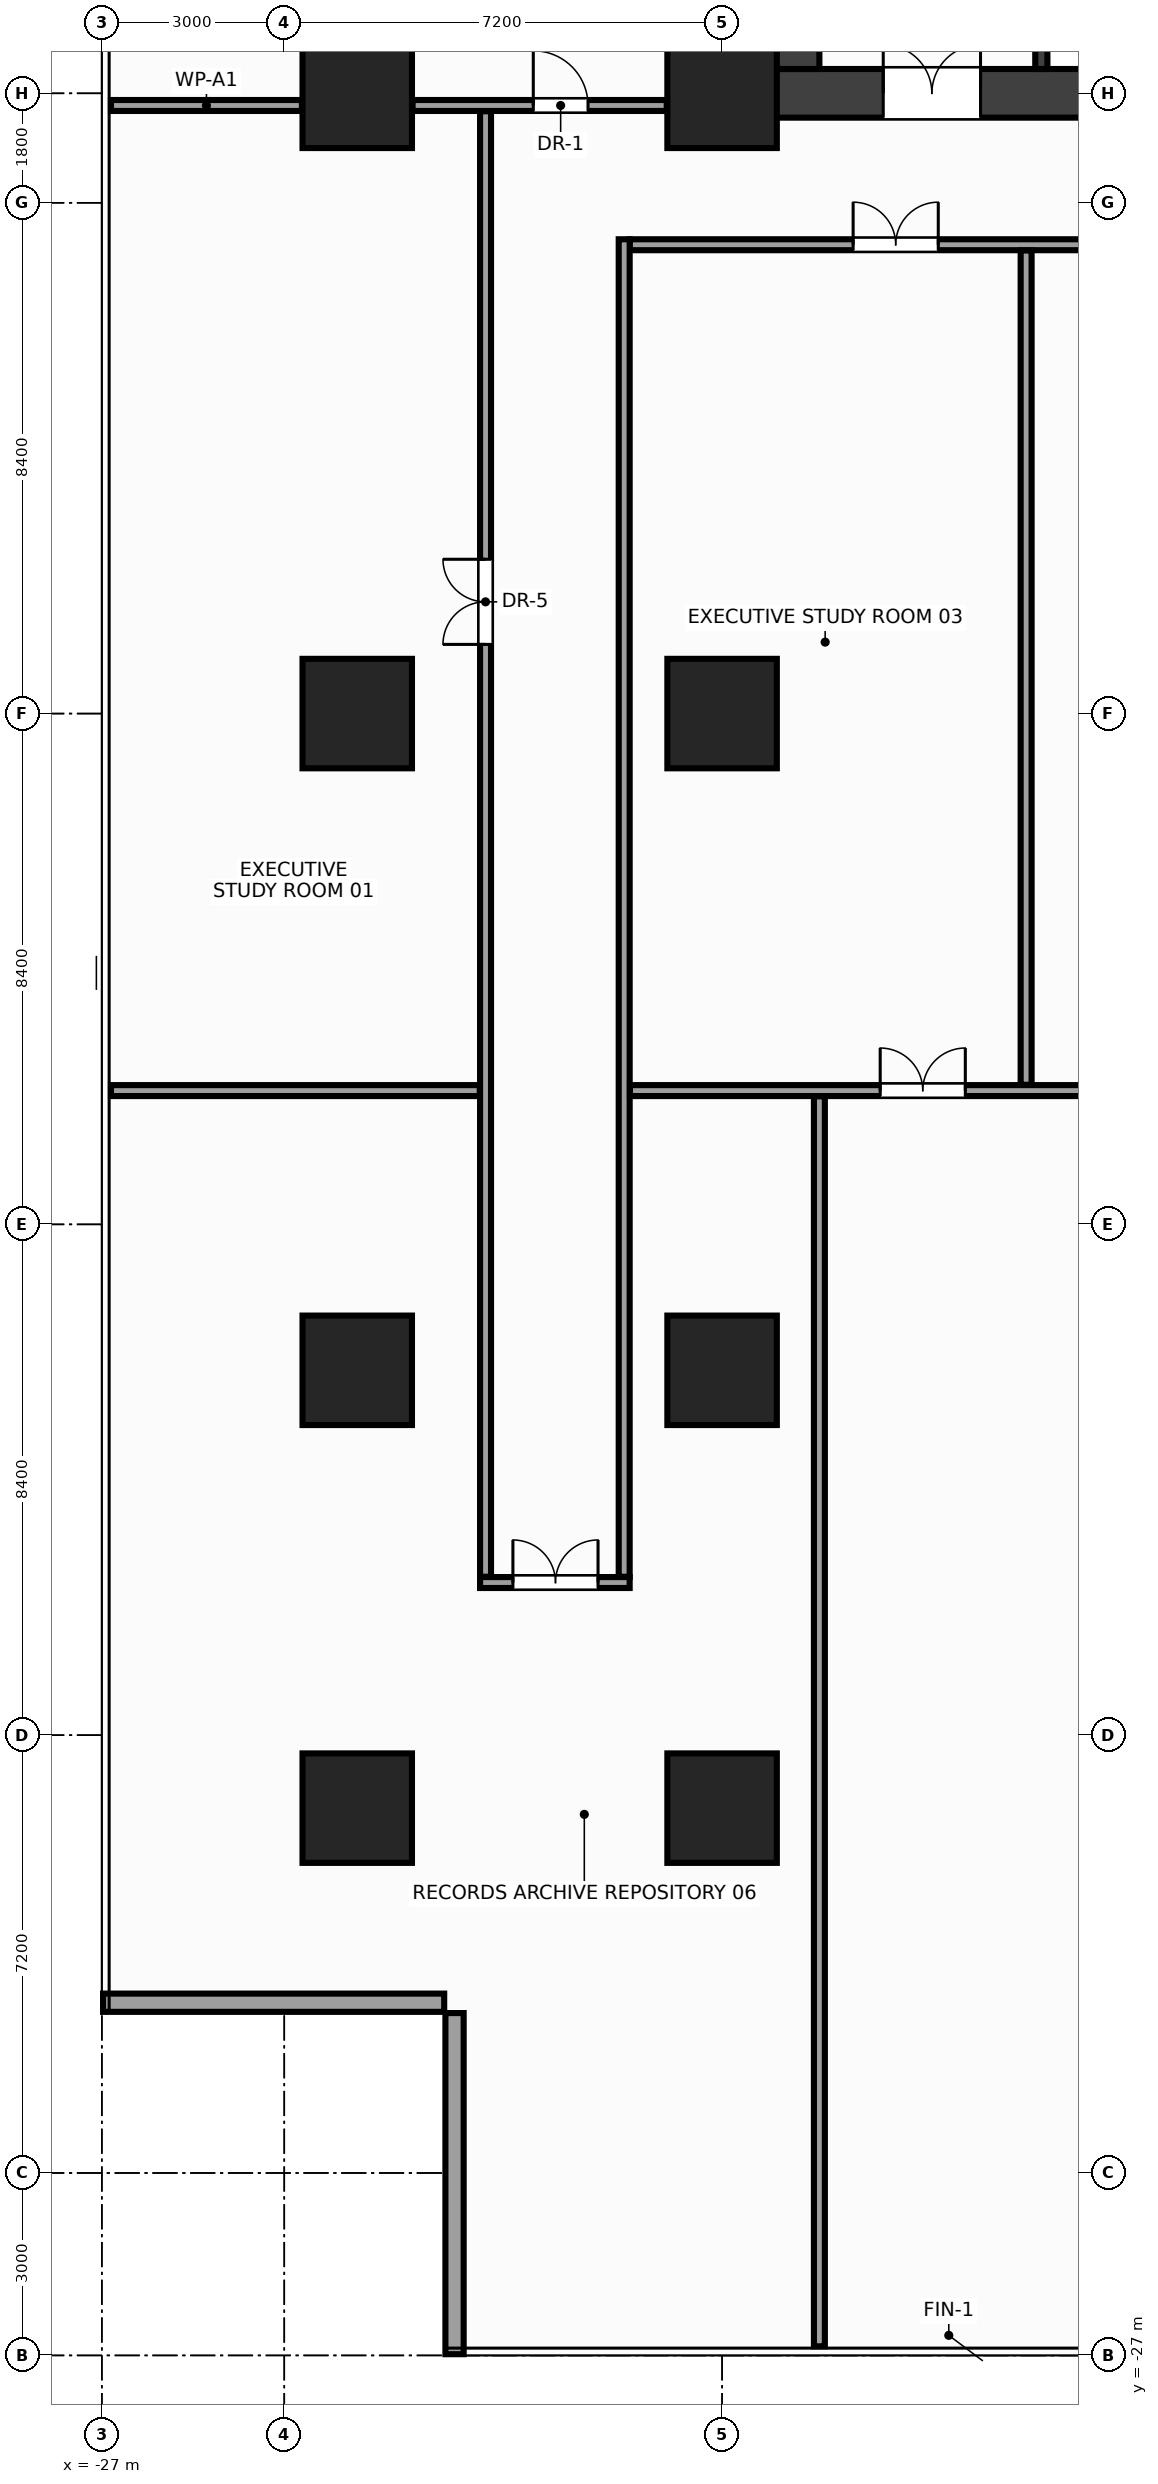
"""IFC4 building model, lengths in metres.
Left out: names, types, materials, properties, quantities, classifications, styles, units other than length and angle.
Written with IfcOpenShell. Run it as: python <this file> out.ifc"""

import sys

from ifc_helpers import new_model, si_unit, direction, frame, frame_2d, origin, origin_2d, place, context, subcontext, project, spatial, rectangle, extrude, source, transform, mapped, element, fill, save


model = new_model("IFC4")
c1 = context("Model", 3, precision=1e-05, world=origin(), true_north=direction((0.0, 1.0)))
c2 = subcontext(c1, "Body", "Model", "MODEL_VIEW")
j1 = project(units=[si_unit("LENGTHUNIT", "METRE"), si_unit("PLANEANGLEUNIT", "RADIAN")], contexts=[c1])
p1 = place(None, origin())
s1 = spatial("IfcSite", under=j1, at=p1, CompositionType="ELEMENT")
p2 = place(p1, origin())
s2 = spatial("IfcBuilding", under=s1, at=p2, CompositionType="ELEMENT")
p3 = place(p2, frame((0.0, 0.0, 66.8)))
s3 = spatial("IfcBuildingStorey", under=s2, at=p3, CompositionType="ELEMENT", Elevation=66.8)
m1 = source(origin(), c2, "Body", "SweptSolid", [
    extrude(rectangle(XDim=32.0, YDim=0.8, at=frame_2d((16.0, 0.0))), origin(), (0.0, 0.0, 1.0), 3.6),
])
p4 = place(p3, frame((-16.0, 10.2, 0.0), z_axis=(0.0, 0.0, 1.0), x_axis=(1.0, 0.0, 0.0)))
e1 = element("IfcWall", 1, at=p4, inside=s3, PredefinedType="SHEAR", context=c2, shape_type="MappedRepresentation", body=[
    mapped(m1, transform((0.0, 0.0, 0.0), x_axis=(1.0, 0.0, 0.0), y_axis=(0.0, 1.0, 0.0), z_axis=(0.0, 0.0, 1.0), scale=1.0)),
])
p5 = place(p4, frame((1.85, 0.0, 0.0)))
e2 = element("IfcOpeningElement", 2, at=p5, cuts=e1, PredefinedType="OPENING", context=c2, shape_type="SweptSolid", body=[
    extrude(rectangle(XDim=1.6, YDim=2.15, at=frame_2d((0.8, 1.075))), frame((0.0, 0.412, 0.0), z_axis=(0.0, -1.0, 0.0), x_axis=(1.0, 0.0, 0.0)), (0.0, 0.0, 1.0), 0.824),
])
p6 = place(p4, frame((28.55, 0.0, 0.0)))
e3 = element("IfcOpeningElement", 3, at=p6, cuts=e1, PredefinedType="OPENING", context=c2, shape_type="SweptSolid", body=[
    extrude(rectangle(XDim=1.6, YDim=2.15, at=frame_2d((0.8, 1.075))), frame((0.0, 0.412, 0.0), z_axis=(0.0, -1.0, 0.0), x_axis=(1.0, 0.0, 0.0)), (0.0, 0.0, 1.0), 0.824),
])
p7 = place(p4, frame((15.25, 0.0, 0.0)))
e4 = element("IfcOpeningElement", 4, at=p7, cuts=e1, PredefinedType="OPENING", context=c2, shape_type="SweptSolid", body=[
    extrude(rectangle(XDim=1.5, YDim=2.2, at=frame_2d((0.75, 1.1))), frame((0.0, 0.412, 0.0), z_axis=(0.0, -1.0, 0.0), x_axis=(1.0, 0.0, 0.0)), (0.0, 0.0, 1.0), 0.824),
])
m2 = source(origin(), c2, "Body", "SweptSolid", [
    extrude(rectangle(XDim=12.8, YDim=0.8, at=frame_2d((6.4, 0.0))), origin(), (0.0, 0.0, 1.0), 3.6),
])
p8 = place(p3, frame((-15.6, 10.6, 0.0), z_axis=(0.0, 0.0, 1.0), x_axis=(0.0, 1.0, 0.0)))
e5 = element("IfcWall", 5, at=p8, inside=s3, PredefinedType="SHEAR", context=c2, shape_type="MappedRepresentation", body=[
    mapped(m2, transform((0.0, 0.0, 0.0), x_axis=(1.0, 0.0, 0.0), y_axis=(0.0, 1.0, 0.0), z_axis=(0.0, 0.0, 1.0), scale=1.0)),
])
m3 = source(origin(), c2, "Body", "SweptSolid", [
    extrude(rectangle(XDim=3.05, YDim=0.2, at=frame_2d((1.525, 0.0))), origin(), (0.0, 0.0, 1.0), 3.6),
])
p9 = place(p3, frame((-11.55, 10.6, 0.0), z_axis=(0.0, 0.0, 1.0), x_axis=(0.0, 1.0, 0.0)))
e6 = element("IfcWall", 6, at=p9, inside=s3, PredefinedType="SHEAR", context=c2, shape_type="MappedRepresentation", body=[
    mapped(m3, transform((0.0, 0.0, 0.0), x_axis=(1.0, 0.0, 0.0), y_axis=(0.0, 1.0, 0.0), z_axis=(0.0, 0.0, 1.0), scale=1.0)),
])
p10 = place(p9, frame((0.9, 0.0, 0.0)))
e7 = element("IfcOpeningElement", 7, at=p10, cuts=e6, PredefinedType="OPENING", context=c2, shape_type="SweptSolid", body=[
    extrude(rectangle(XDim=1.1, YDim=2.15, at=frame_2d((0.55, 1.075))), frame((0.0, 0.112, 0.0), z_axis=(0.0, -1.0, 0.0), x_axis=(1.0, 0.0, 0.0)), (0.0, 0.0, 1.0), 0.224),
])
m4 = source(origin(), c2, "Body", "SweptSolid", [
    extrude(rectangle(XDim=1.8, YDim=1.8, at=origin_2d()), origin(), (0.0, 0.0, 1.0), 3.6),
])
for number, where, z_axis, x_axis in (
    (8, (-16.8, -18.0, 0.0), (0.0, 0.0, 1.0), (1.0, 0.0, 0.0)),
    (9, (-16.8, -10.8, 0.0), (0.0, 0.0, 1.0), (1.0, 0.0, 0.0)),
    (10, (-16.8, 0.0, 0.0), (0.0, 0.0, 1.0), (1.0, 0.0, 0.0)),
    (11, (-16.8, 10.2, 0.0), (0.0, 0.0, 1.0), (1.0, 0.0, 0.0)),
    (12, (-22.8, -18.0, 0.0), (0.0, 0.0, 1.0), (1.0, 0.0, 0.0)),
    (13, (-22.8, -10.8, 0.0), (0.0, 0.0, 1.0), (1.0, 0.0, 0.0)),
    (14, (-22.8, 0.0, 0.0), (0.0, 0.0, 1.0), (1.0, 0.0, 0.0)),
    (15, (-22.8, 10.2, 0.0), (0.0, 0.0, 1.0), (1.0, 0.0, 0.0)),
):
    element("IfcColumn", number, at=place(p3, frame(where, z_axis=z_axis, x_axis=x_axis)), inside=s3, PredefinedType="COLUMN", context=c2, shape_type="MappedRepresentation", body=[
        mapped(m4, transform((0.0, 0.0, 0.0), x_axis=(1.0, 0.0, 0.0), y_axis=(0.0, 1.0, 0.0), z_axis=(0.0, 0.0, 1.0), scale=1.0)),
    ])
m5 = source(origin(), c2, "Body", "SweptSolid", [
    extrude(rectangle(XDim=5.61, YDim=0.3, at=frame_2d((2.805, 0.0))), origin(), (0.0, 0.0, 1.0), 2.68),
])
for number, where, z_axis, x_axis in (
    (16, (-26.98, -21.2, 0.0), (0.0, 0.0, 1.0), (1.0, 0.0, 0.0)),
    (17, (-21.2, -21.37, 0.0), (0.0, 0.0, 1.0), (0.0, -1.0, 0.0)),
):
    element("IfcWall", number, at=place(p3, frame(where, z_axis=z_axis, x_axis=x_axis)), inside=s3, PredefinedType="STANDARD", context=c2, shape_type="MappedRepresentation", body=[
        mapped(m5, transform((0.0, 0.0, 0.0), x_axis=(1.0, 0.0, 0.0), y_axis=(0.0, 1.0, 0.0), z_axis=(0.0, 0.0, 1.0), scale=1.0)),
    ])
m6 = source(origin(), c2, "Body", "SweptSolid", [
    extrude(rectangle(XDim=3.14, YDim=0.18, at=frame_2d((1.57, 0.0))), origin(), (0.0, 0.0, 1.0), 2.375),
])
p11 = place(p3, frame((-26.85, 10.0, 0.0), z_axis=(0.0, 0.0, 1.0), x_axis=(1.0, 0.0, 0.0)))
e18 = element("IfcWall", 18, at=p11, inside=s3, PredefinedType="PARTITIONING", context=c2, shape_type="MappedRepresentation", body=[
    mapped(m6, transform((0.0, 0.0, 0.0), x_axis=(1.0, 0.0, 0.0), y_axis=(0.0, 1.0, 0.0), z_axis=(0.0, 0.0, 1.0), scale=1.0)),
])
m7 = source(origin(), c2, "Body", "SweptSolid", [
    extrude(rectangle(XDim=4.18, YDim=0.18, at=frame_2d((2.09, 0.0))), origin(), (0.0, 0.0, 1.0), 2.685),
])
p12 = place(p3, frame((-21.89, 10.0, 0.0), z_axis=(0.0, 0.0, 1.0), x_axis=(1.0, 0.0, 0.0)))
e19 = element("IfcWall", 19, at=p12, inside=s3, PredefinedType="PARTITIONING", context=c2, shape_type="MappedRepresentation", body=[
    mapped(m7, transform((0.0, 0.0, 0.0), x_axis=(1.0, 0.0, 0.0), y_axis=(0.0, 1.0, 0.0), z_axis=(0.0, 0.0, 1.0), scale=1.0)),
])
p13 = place(p12, frame((1.985, 0.0, 0.0)))
e20 = element("IfcOpeningElement", 20, at=p13, cuts=e19, PredefinedType="OPENING", context=c2, shape_type="SweptSolid", body=[
    extrude(rectangle(XDim=0.9, YDim=2.15, at=frame_2d((0.45, 1.075))), frame((0.0, 0.102, 0.0), z_axis=(0.0, -1.0, 0.0), x_axis=(1.0, 0.0, 0.0)), (0.0, 0.0, 1.0), 0.204),
])
m8 = source(origin(), c2, "Body", "SweptSolid", [
    extrude(rectangle(XDim=36.64, YDim=0.18, at=frame_2d((18.32, 0.0))), origin(), (0.0, 0.0, 1.0), 2.685),
])
p14 = place(p3, frame((-18.32, 7.71, 0.0), z_axis=(0.0, 0.0, 1.0), x_axis=(1.0, 0.0, 0.0)))
e21 = element("IfcWall", 21, at=p14, inside=s3, PredefinedType="PARTITIONING", context=c2, shape_type="MappedRepresentation", body=[
    mapped(m8, transform((0.0, 0.0, 0.0), x_axis=(1.0, 0.0, 0.0), y_axis=(0.0, 1.0, 0.0), z_axis=(0.0, 0.0, 1.0), scale=1.0)),
])
p15 = place(p14, frame((3.675, 0.0, 0.0)))
e22 = element("IfcOpeningElement", 22, at=p15, cuts=e21, PredefinedType="OPENING", context=c2, shape_type="SweptSolid", body=[
    extrude(rectangle(XDim=1.4, YDim=2.2, at=frame_2d((0.7, 1.1))), frame((0.0, 0.102, 0.0), z_axis=(0.0, -1.0, 0.0), x_axis=(1.0, 0.0, 0.0)), (0.0, 0.0, 1.0), 0.204),
])
p16 = place(p14, frame((17.62, 0.0, 0.0)))
e23 = element("IfcOpeningElement", 23, at=p16, cuts=e21, PredefinedType="OPENING", context=c2, shape_type="SweptSolid", body=[
    extrude(rectangle(XDim=1.4, YDim=2.2, at=frame_2d((0.7, 1.1))), frame((0.0, 0.102, 0.0), z_axis=(0.0, -1.0, 0.0), x_axis=(1.0, 0.0, 0.0)), (0.0, 0.0, 1.0), 0.204),
])
p17 = place(p14, frame((32.665, 0.0, 0.0)))
e24 = element("IfcOpeningElement", 24, at=p17, cuts=e21, PredefinedType="OPENING", context=c2, shape_type="SweptSolid", body=[
    extrude(rectangle(XDim=1.4, YDim=2.2, at=frame_2d((0.7, 1.1))), frame((0.0, 0.102, 0.0), z_axis=(0.0, -1.0, 0.0), x_axis=(1.0, 0.0, 0.0)), (0.0, 0.0, 1.0), 0.204),
])
m9 = source(origin(), c2, "Body", "SweptSolid", [
    extrude(rectangle(XDim=2.46, YDim=0.18, at=frame_2d((1.23, 0.0))), origin(), (0.0, 0.0, 1.0), 2.835),
])
p18 = place(p3, frame((-20.78, -14.29, 0.0), z_axis=(0.0, 0.0, 1.0), x_axis=(1.0, 0.0, 0.0)))
e25 = element("IfcWall", 25, at=p18, inside=s3, PredefinedType="PARTITIONING", context=c2, shape_type="MappedRepresentation", body=[
    mapped(m9, transform((0.0, 0.0, 0.0), x_axis=(1.0, 0.0, 0.0), y_axis=(0.0, 1.0, 0.0), z_axis=(0.0, 0.0, 1.0), scale=1.0)),
])
p19 = place(p18, frame((0.54, 0.0, 0.0)))
e26 = element("IfcOpeningElement", 26, at=p19, cuts=e25, PredefinedType="OPENING", context=c2, shape_type="SweptSolid", body=[
    extrude(rectangle(XDim=1.4, YDim=2.2, at=frame_2d((0.7, 1.1))), frame((0.0, 0.102, 0.0), z_axis=(0.0, -1.0, 0.0), x_axis=(1.0, 0.0, 0.0)), (0.0, 0.0, 1.0), 0.204),
])
m10 = source(origin(), c2, "Body", "SweptSolid", [
    extrude(rectangle(XDim=24.1, YDim=0.18, at=frame_2d((12.05, 0.0))), origin(), (0.0, 0.0, 1.0), 2.685),
])
p20 = place(p3, frame((-20.69, -14.195, 0.0), z_axis=(0.0, 0.0, 1.0), x_axis=(0.0, 1.0, 0.0)))
e27 = element("IfcWall", 27, at=p20, inside=s3, PredefinedType="PARTITIONING", context=c2, shape_type="MappedRepresentation", body=[
    mapped(m10, transform((0.0, 0.0, 0.0), x_axis=(1.0, 0.0, 0.0), y_axis=(0.0, 1.0, 0.0), z_axis=(0.0, 0.0, 1.0), scale=1.0)),
])
p21 = place(p20, frame((15.333, 0.0, 0.0)))
e28 = element("IfcOpeningElement", 28, at=p21, cuts=e27, PredefinedType="OPENING", context=c2, shape_type="SweptSolid", body=[
    extrude(rectangle(XDim=1.4, YDim=2.2, at=frame_2d((0.7, 1.1))), frame((0.0, 0.102, 0.0), z_axis=(0.0, -1.0, 0.0), x_axis=(1.0, 0.0, 0.0)), (0.0, 0.0, 1.0), 0.204),
])
m11 = source(origin(), c2, "Body", "SweptSolid", [
    extrude(rectangle(XDim=21.995, YDim=0.18, at=frame_2d((10.998, 0.0))), origin(), (0.0, 0.0, 1.0), 2.685),
])
p22 = place(p3, frame((-18.41, -14.195, 0.0), z_axis=(0.0, 0.0, 1.0), x_axis=(0.0, 1.0, 0.0)))
e29 = element("IfcWall", 29, at=p22, inside=s3, PredefinedType="PARTITIONING", context=c2, shape_type="MappedRepresentation", body=[
    mapped(m11, transform((0.0, 0.0, 0.0), x_axis=(1.0, 0.0, 0.0), y_axis=(0.0, 1.0, 0.0), z_axis=(0.0, 0.0, 1.0), scale=1.0)),
])
m12 = source(origin(), c2, "Body", "SweptSolid", [
    extrude(rectangle(XDim=6.065, YDim=0.18, at=frame_2d((3.033, 0.0))), origin(), (0.0, 0.0, 1.0), 2.685),
])
p23 = place(p3, frame((-26.85, -6.2, 0.0), z_axis=(0.0, 0.0, 1.0), x_axis=(1.0, 0.0, 0.0)))
e30 = element("IfcWall", 30, at=p23, inside=s3, PredefinedType="PARTITIONING", context=c2, shape_type="MappedRepresentation", body=[
    mapped(m12, transform((0.0, 0.0, 0.0), x_axis=(1.0, 0.0, 0.0), y_axis=(0.0, 1.0, 0.0), z_axis=(0.0, 0.0, 1.0), scale=1.0)),
])
m13 = source(origin(), c2, "Body", "SweptSolid", [
    extrude(rectangle(XDim=36.63, YDim=0.18, at=frame_2d((18.315, 0.0))), origin(), (0.0, 0.0, 1.0), 2.685),
])
p24 = place(p3, frame((-18.315, -6.2, 0.0), z_axis=(0.0, 0.0, 1.0), x_axis=(1.0, 0.0, 0.0)))
e31 = element("IfcWall", 31, at=p24, inside=s3, PredefinedType="PARTITIONING", context=c2, shape_type="MappedRepresentation", body=[
    mapped(m13, transform((0.0, 0.0, 0.0), x_axis=(1.0, 0.0, 0.0), y_axis=(0.0, 1.0, 0.0), z_axis=(0.0, 0.0, 1.0), scale=1.0)),
])
p25 = place(p24, frame((4.115, 0.0, 0.0)))
e32 = element("IfcOpeningElement", 32, at=p25, cuts=e31, PredefinedType="OPENING", context=c2, shape_type="SweptSolid", body=[
    extrude(rectangle(XDim=1.4, YDim=2.2, at=frame_2d((0.7, 1.1))), frame((0.0, 0.102, 0.0), z_axis=(0.0, -1.0, 0.0), x_axis=(1.0, 0.0, 0.0)), (0.0, 0.0, 1.0), 0.204),
])
p26 = place(p24, frame((21.215, 0.0, 0.0)))
e33 = element("IfcOpeningElement", 33, at=p26, cuts=e31, PredefinedType="OPENING", context=c2, shape_type="SweptSolid", body=[
    extrude(rectangle(XDim=1.4, YDim=2.2, at=frame_2d((0.7, 1.1))), frame((0.0, 0.102, 0.0), z_axis=(0.0, -1.0, 0.0), x_axis=(1.0, 0.0, 0.0)), (0.0, 0.0, 1.0), 0.204),
])
m14 = source(origin(), c2, "Body", "SweptSolid", [
    extrude(rectangle(XDim=13.72, YDim=0.18, at=frame_2d((6.86, 0.0))), origin(), (0.0, 0.0, 1.0), 2.585),
])
p27 = place(p3, frame((-11.8, -6.105, 0.0), z_axis=(0.0, 0.0, 1.0), x_axis=(0.0, 1.0, 0.0)))
e34 = element("IfcWall", 34, at=p27, inside=s3, PredefinedType="PARTITIONING", context=c2, shape_type="MappedRepresentation", body=[
    mapped(m14, transform((0.0, 0.0, 0.0), x_axis=(1.0, 0.0, 0.0), y_axis=(0.0, 1.0, 0.0), z_axis=(0.0, 0.0, 1.0), scale=1.0)),
])
m15 = source(origin(), c2, "Body", "SweptSolid", [
    extrude(rectangle(XDim=20.555, YDim=0.18, at=frame_2d((10.278, 0.0))), origin(), (0.0, 0.0, 1.0), 2.685),
])
p28 = place(p3, frame((-15.2, -26.85, 0.0), z_axis=(0.0, 0.0, 1.0), x_axis=(0.0, 1.0, 0.0)))
e35 = element("IfcWall", 35, at=p28, inside=s3, PredefinedType="PARTITIONING", context=c2, shape_type="MappedRepresentation", body=[
    mapped(m15, transform((0.0, 0.0, 0.0), x_axis=(1.0, 0.0, 0.0), y_axis=(0.0, 1.0, 0.0), z_axis=(0.0, 0.0, 1.0), scale=1.0)),
])
m16 = source(origin(), c2, "Body", "SweptSolid", [
    extrude(rectangle(XDim=1.6, YDim=2.15, at=frame_2d((0.8, 1.075))), frame((0.0, 0.025, 0.0), z_axis=(0.0, -1.0, 0.0), x_axis=(1.0, 0.0, 0.0)), (0.0, 0.0, 1.0), 0.05),
])
p29 = place(p5, origin())
e36 = element("IfcDoor", 36, at=p29, inside=s3, OperationType="DOUBLE_DOOR_SINGLE_SWING", PredefinedType="DOOR", context=c2, shape_type="MappedRepresentation", body=[
    mapped(m16, transform((0.0, 0.0, 0.0), x_axis=(1.0, 0.0, 0.0), y_axis=(0.0, 1.0, 0.0), z_axis=(0.0, 0.0, 1.0), scale=1.0)),
])
fill(e2, e36)
m17 = source(origin(), c2, "Body", "SweptSolid", [
    extrude(rectangle(XDim=0.9, YDim=2.15, at=frame_2d((0.45, 1.075))), frame((0.0, 0.025, 0.0), z_axis=(0.0, -1.0, 0.0), x_axis=(1.0, 0.0, 0.0)), (0.0, 0.0, 1.0), 0.05),
])
p30 = place(p13, origin())
e37 = element("IfcDoor", 37, at=p30, inside=s3, OperationType="SINGLE_SWING_LEFT", PredefinedType="DOOR", context=c2, shape_type="MappedRepresentation", body=[
    mapped(m17, transform((0.0, 0.0, 0.0), x_axis=(1.0, 0.0, 0.0), y_axis=(0.0, 1.0, 0.0), z_axis=(0.0, 0.0, 1.0), scale=1.0)),
])
fill(e20, e37)
m18 = source(origin(), c2, "Body", "SweptSolid", [
    extrude(rectangle(XDim=1.4, YDim=2.2, at=frame_2d((0.7, 1.1))), frame((0.0, 0.025, 0.0), z_axis=(0.0, -1.0, 0.0), x_axis=(1.0, 0.0, 0.0)), (0.0, 0.0, 1.0), 0.05),
])
p31 = place(p21, origin())
e38 = element("IfcDoor", 38, at=p31, inside=s3, OperationType="DOUBLE_DOOR_SINGLE_SWING", PredefinedType="DOOR", context=c2, shape_type="MappedRepresentation", body=[
    mapped(m18, transform((0.0, 0.0, 0.0), x_axis=(1.0, 0.0, 0.0), y_axis=(0.0, 1.0, 0.0), z_axis=(0.0, 0.0, 1.0), scale=1.0)),
])
fill(e28, e38)
p32 = place(p15, origin())
e39 = element("IfcDoor", 39, at=p32, inside=s3, OperationType="DOUBLE_DOOR_SINGLE_SWING", PredefinedType="DOOR", context=c2, shape_type="MappedRepresentation", body=[
    mapped(m18, transform((0.0, 0.0, 0.0), x_axis=(1.0, 0.0, 0.0), y_axis=(0.0, 1.0, 0.0), z_axis=(0.0, 0.0, 1.0), scale=1.0)),
])
fill(e22, e39)
p33 = place(p19, origin())
e40 = element("IfcDoor", 40, at=p33, inside=s3, OperationType="DOUBLE_DOOR_SINGLE_SWING", PredefinedType="DOOR", context=c2, shape_type="MappedRepresentation", body=[
    mapped(m18, transform((0.0, 0.0, 0.0), x_axis=(1.0, 0.0, 0.0), y_axis=(0.0, 1.0, 0.0), z_axis=(0.0, 0.0, 1.0), scale=1.0)),
])
fill(e26, e40)
p34 = place(p25, origin())
e41 = element("IfcDoor", 41, at=p34, inside=s3, OperationType="DOUBLE_DOOR_SINGLE_SWING", PredefinedType="DOOR", context=c2, shape_type="MappedRepresentation", body=[
    mapped(m18, transform((0.0, 0.0, 0.0), x_axis=(1.0, 0.0, 0.0), y_axis=(0.0, 1.0, 0.0), z_axis=(0.0, 0.0, 1.0), scale=1.0)),
])
fill(e32, e41)
save(model, sys.argv[1])
